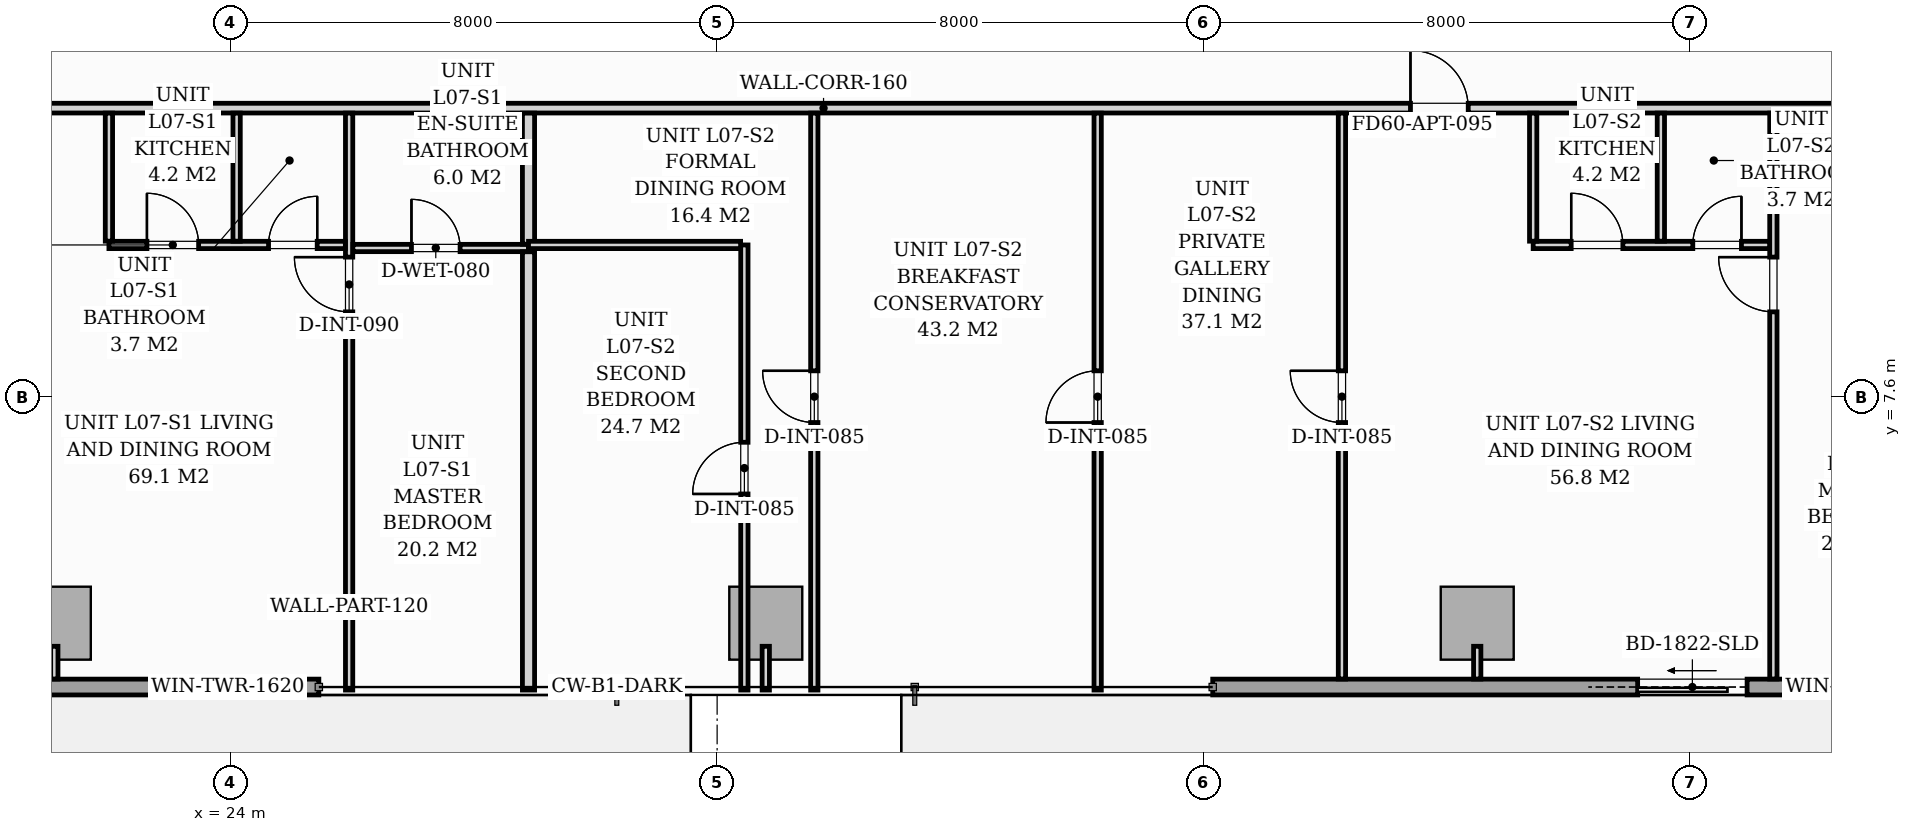
"""IFC4 building model, lengths in metres.
Left out: names, types, materials, properties, quantities, classifications, styles, units other than length and angle.
Written with IfcOpenShell. Run it as: python <this file> out.ifc"""

import sys

from ifc_helpers import new_model, si_unit, direction, frame, frame_2d, origin, origin_2d, place, context, subcontext, project, spatial, rectangle, extrude, source, transform, mapped, element, fill, save


model = new_model("IFC4")
c1 = context("Model", 3, precision=1e-05, world=origin(), true_north=direction((0.0, 1.0)))
c2 = subcontext(c1, "Body", "Model", "MODEL_VIEW")
j1 = project(units=[si_unit("LENGTHUNIT", "METRE"), si_unit("PLANEANGLEUNIT", "RADIAN")], contexts=[c1])
p1 = place(None, origin())
s1 = spatial("IfcSite", under=j1, at=p1, CompositionType="ELEMENT")
p2 = place(p1, origin())
s2 = spatial("IfcBuilding", under=s1, at=p2, CompositionType="ELEMENT")
p3 = place(p2, frame((0.0, 0.0, 29.4)))
s3 = spatial("IfcBuildingStorey", under=s2, at=p3, CompositionType="ELEMENT", Elevation=29.4)
m1 = source(origin(), c2, "Body", "SweptSolid", [
    extrude(rectangle(XDim=1.2, YDim=1.2, at=origin_2d()), origin(), (0.0, 0.0, 1.0), 3.196),
])
for number, where, z_axis, x_axis in (
    (1, (21.1, 3.88, 0.002), (0.0, 0.0, 1.0), (1.0, 0.0, 0.0)),
    (2, (32.8, 3.88, 0.002), (0.0, 0.0, 1.0), (1.0, 0.0, 0.0)),
    (3, (44.5, 3.88, 0.002), (0.0, 0.0, 1.0), (1.0, 0.0, 0.0)),
):
    element("IfcColumn", number, at=place(p3, frame(where, z_axis=z_axis, x_axis=x_axis)), inside=s3, PredefinedType="COLUMN", context=c2, shape_type="MappedRepresentation", body=[
        mapped(m1, transform((0.0, 0.0, 0.0), scale=1.0)),
    ])
p4 = place(p3, frame((57.3, 2.83, 0.0), z_axis=(0.0, 0.0, 1.0), x_axis=(-1.0, 0.0, 0.0)))
e4 = element("IfcWall", 4, at=p4, inside=s3, PredefinedType="STANDARD", context=c2, shape_type="SweptSolid", body=[
    extrude(rectangle(XDim=17.15, YDim=0.26, at=frame_2d((8.575, 0.0))), origin(), (0.0, 0.0, 1.0), 2.94),
])
p5 = place(p4, frame((8.362, 0.0, 0.0)))
e5 = element("IfcOpeningElement", 5, at=p5, cuts=e4, PredefinedType="OPENING", context=c2, shape_type="SweptSolid", body=[
    extrude(rectangle(XDim=1.8, YDim=2.06, at=frame_2d((0.9, 1.03))), frame((0.0, 0.14, 0.0), z_axis=(0.0, -1.0, 0.0), x_axis=(1.0, 0.0, 0.0)), (0.0, 0.0, 1.0), 0.28),
])
p6 = place(p4, frame((2.05, 0.0, 0.65)))
e6 = element("IfcOpeningElement", 6, at=p6, cuts=e4, PredefinedType="OPENING", context=c2, shape_type="SweptSolid", body=[
    extrude(rectangle(XDim=1.6, YDim=1.5, at=frame_2d((0.8, 0.75))), frame((0.0, 0.14, 0.0), z_axis=(0.0, -1.0, 0.0), x_axis=(1.0, 0.0, 0.0)), (0.0, 0.0, 1.0), 0.28),
])
p7 = place(p4, frame((5.675, 0.0, 0.75)))
e7 = element("IfcOpeningElement", 7, at=p7, cuts=e4, PredefinedType="OPENING", context=c2, shape_type="SweptSolid", body=[
    extrude(rectangle(XDim=1.6, YDim=1.5, at=frame_2d((0.8, 0.75))), frame((0.0, 0.14, 0.0), z_axis=(0.0, -1.0, 0.0), x_axis=(1.0, 0.0, 0.0)), (0.0, 0.0, 1.0), 0.28),
])
p8 = place(p3, frame((25.45, 2.83, 0.0), z_axis=(0.0, 0.0, 1.0), x_axis=(-1.0, 0.0, 0.0)))
e8 = element("IfcWall", 8, at=p8, inside=s3, PredefinedType="STANDARD", context=c2, shape_type="SweptSolid", body=[
    extrude(rectangle(XDim=17.15, YDim=0.26, at=frame_2d((8.575, 0.0))), origin(), (0.0, 0.0, 1.0), 2.94),
])
p9 = place(p8, frame((7.49, 0.0, 0.0)))
e9 = element("IfcOpeningElement", 9, at=p9, cuts=e8, PredefinedType="OPENING", context=c2, shape_type="SweptSolid", body=[
    extrude(rectangle(XDim=1.8, YDim=2.06, at=frame_2d((0.9, 1.03))), frame((0.0, 0.14, 0.0), z_axis=(0.0, -1.0, 0.0), x_axis=(1.0, 0.0, 0.0)), (0.0, 0.0, 1.0), 0.28),
])
p10 = place(p8, frame((0.7, 0.0, 0.65)))
e10 = element("IfcOpeningElement", 10, at=p10, cuts=e8, PredefinedType="OPENING", context=c2, shape_type="SweptSolid", body=[
    extrude(rectangle(XDim=1.6, YDim=1.5, at=frame_2d((0.8, 0.75))), frame((0.0, 0.14, 0.0), z_axis=(0.0, -1.0, 0.0), x_axis=(1.0, 0.0, 0.0)), (0.0, 0.0, 1.0), 0.28),
])
p11 = place(p8, frame((12.84, 0.0, 0.75)))
e11 = element("IfcOpeningElement", 11, at=p11, cuts=e8, PredefinedType="OPENING", context=c2, shape_type="SweptSolid", body=[
    extrude(rectangle(XDim=1.6, YDim=1.5, at=frame_2d((0.8, 0.75))), frame((0.0, 0.14, 0.0), z_axis=(0.0, -1.0, 0.0), x_axis=(1.0, 0.0, 0.0)), (0.0, 0.0, 1.0), 0.28),
])
p12 = place(p3, frame((15.2, 12.35, 0.0), z_axis=(0.0, 0.0, 1.0), x_axis=(1.0, 0.0, 0.0)))
e12 = element("IfcWall", 12, at=p12, inside=s3, PredefinedType="PARTITIONING", context=c2, shape_type="SweptSolid", body=[
    extrude(rectangle(XDim=37.1, YDim=0.16, at=frame_2d((18.55, 0.0))), origin(), (0.0, 0.0, 1.0), 2.94),
])
p13 = place(p12, frame((2.964, 0.0, 0.0)))
e13 = element("IfcOpeningElement", 13, at=p13, cuts=e12, PredefinedType="OPENING", context=c2, shape_type="SweptSolid", body=[
    extrude(rectangle(XDim=0.95, YDim=2.06, at=frame_2d((0.475, 1.03))), frame((0.0, 0.09, 0.0), z_axis=(0.0, -1.0, 0.0), x_axis=(1.0, 0.0, 0.0)), (0.0, 0.0, 1.0), 0.18),
])
p14 = place(p12, frame((28.202, 0.0, 0.0)))
e14 = element("IfcOpeningElement", 14, at=p14, cuts=e12, PredefinedType="OPENING", context=c2, shape_type="SweptSolid", body=[
    extrude(rectangle(XDim=0.95, YDim=2.06, at=frame_2d((0.475, 1.03))), frame((0.0, 0.09, 0.0), z_axis=(0.0, -1.0, 0.0), x_axis=(1.0, 0.0, 0.0)), (0.0, 0.0, 1.0), 0.18),
])
p15 = place(p3, frame((25.948, 2.78, 0.0), z_axis=(0.0, 0.0, 1.0), x_axis=(0.0, 1.0, 0.0)))
e15 = element("IfcWall", 15, at=p15, inside=s3, PredefinedType="PARTITIONING", context=c2, shape_type="SweptSolid", body=[
    extrude(rectangle(XDim=9.488, YDim=0.12, at=frame_2d((4.744, 0.0))), origin(), (0.0, 0.0, 1.0), 2.94),
])
p16 = place(p15, frame((6.22, 0.0, 0.0)))
e16 = element("IfcOpeningElement", 16, at=p16, cuts=e15, PredefinedType="OPENING", context=c2, shape_type="SweptSolid", body=[
    extrude(rectangle(XDim=0.9, YDim=2.05, at=frame_2d((0.45, 1.025))), frame((0.0, 0.07, 0.0), z_axis=(0.0, -1.0, 0.0), x_axis=(1.0, 0.0, 0.0)), (0.0, 0.0, 1.0), 0.14),
])
p17 = place(p3, frame((21.998, 10.1, 0.0), z_axis=(0.0, 0.0, 1.0), x_axis=(1.0, 0.0, 0.0)))
e17 = element("IfcWall", 17, at=p17, inside=s3, PredefinedType="PARTITIONING", context=c2, shape_type="SweptSolid", body=[
    extrude(rectangle(XDim=3.888, YDim=0.12, at=frame_2d((1.944, 0.0))), origin(), (0.0, 0.0, 1.0), 2.94),
])
p18 = place(p17, frame((0.625, 0.0, 0.0)))
e18 = element("IfcOpeningElement", 18, at=p18, cuts=e17, PredefinedType="OPENING", context=c2, shape_type="SweptSolid", body=[
    extrude(rectangle(XDim=0.85, YDim=2.05, at=frame_2d((0.425, 1.025))), frame((0.0, 0.07, 0.0), z_axis=(0.0, -1.0, 0.0), x_axis=(1.0, 0.0, 0.0)), (0.0, 0.0, 1.0), 0.14),
])
p19 = place(p17, frame((2.625, 0.0, 0.0)))
e19 = element("IfcOpeningElement", 19, at=p19, cuts=e17, PredefinedType="OPENING", context=c2, shape_type="SweptSolid", body=[
    extrude(rectangle(XDim=0.8, YDim=2.02, at=frame_2d((0.4, 1.01))), frame((0.0, 0.07, 0.0), z_axis=(0.0, -1.0, 0.0), x_axis=(1.0, 0.0, 0.0)), (0.0, 0.0, 1.0), 0.14),
])
for number, where, z_axis, x_axis in (
    (20, (24.098, 10.162, 0.0), (0.0, 0.0, 1.0), (0.0, 1.0, 0.0)),
    (21, (21.998, 10.162, 0.0), (0.0, 0.0, 1.0), (0.0, 1.0, 0.0)),
):
    element("IfcWall", number, at=place(p3, frame(where, z_axis=z_axis, x_axis=x_axis)), inside=s3, PredefinedType="PARTITIONING", context=c2, shape_type="SweptSolid", body=[
        extrude(rectangle(XDim=2.106, YDim=0.12, at=frame_2d((1.053, 0.0))), origin(), (0.0, 0.0, 1.0), 2.94),
    ])
p20 = place(p3, frame((26.01, 10.05, 0.0), z_axis=(0.0, 0.0, 1.0), x_axis=(1.0, 0.0, 0.0)))
e22 = element("IfcWall", 22, at=p20, inside=s3, PredefinedType="PARTITIONING", context=c2, shape_type="SweptSolid", body=[
    extrude(rectangle(XDim=2.888, YDim=0.12, at=frame_2d((1.444, 0.0))), origin(), (0.0, 0.0, 1.0), 2.94),
])
p21 = place(p20, frame((0.963, 0.0, 0.0)))
e23 = element("IfcOpeningElement", 23, at=p21, cuts=e22, PredefinedType="OPENING", context=c2, shape_type="SweptSolid", body=[
    extrude(rectangle(XDim=0.8, YDim=2.02, at=frame_2d((0.4, 1.01))), frame((0.0, 0.07, 0.0), z_axis=(0.0, -1.0, 0.0), x_axis=(1.0, 0.0, 0.0)), (0.0, 0.0, 1.0), 0.14),
])
p22 = place(p3, frame((28.898, 2.78, 0.0), z_axis=(0.0, 0.0, 1.0), x_axis=(0.0, 1.0, 0.0)))
e24 = element("IfcWall", 24, at=p22, inside=s3, PredefinedType="PARTITIONING", context=c2, shape_type="SweptSolid", body=[
    extrude(rectangle(XDim=7.208, YDim=0.2, at=frame_2d((3.604, 0.0))), origin(), (0.0, 0.0, 1.0), 2.94),
])
p23 = place(p3, frame((28.898, 10.112, 0.0), z_axis=(0.0, 0.0, 1.0), x_axis=(0.0, 1.0, 0.0)))
e25 = element("IfcWall", 25, at=p23, inside=s3, PredefinedType="PARTITIONING", context=c2, shape_type="SweptSolid", body=[
    extrude(rectangle(XDim=2.156, YDim=0.2, at=frame_2d((1.078, 0.0))), origin(), (0.0, 0.0, 1.0), 2.94),
])
p24 = place(p3, frame((49.37, 2.962, 0.0), z_axis=(0.0, 0.0, 1.0), x_axis=(0.0, 1.0, 0.0)))
e26 = element("IfcWall", 26, at=p24, inside=s3, PredefinedType="PARTITIONING", context=c2, shape_type="SweptSolid", body=[
    extrude(rectangle(XDim=9.306, YDim=0.12, at=frame_2d((4.653, 0.0))), origin(), (0.0, 0.0, 1.0), 2.94),
])
p25 = place(p24, frame((6.038, 0.0, 0.0)))
e27 = element("IfcOpeningElement", 27, at=p25, cuts=e26, PredefinedType="OPENING", context=c2, shape_type="SweptSolid", body=[
    extrude(rectangle(XDim=0.9, YDim=2.05, at=frame_2d((0.45, 1.025))), frame((0.0, 0.07, 0.0), z_axis=(0.0, -1.0, 0.0), x_axis=(1.0, 0.0, 0.0)), (0.0, 0.0, 1.0), 0.14),
])
p26 = place(p3, frame((45.42, 10.1, 0.0), z_axis=(0.0, 0.0, 1.0), x_axis=(1.0, 0.0, 0.0)))
e28 = element("IfcWall", 28, at=p26, inside=s3, PredefinedType="PARTITIONING", context=c2, shape_type="SweptSolid", body=[
    extrude(rectangle(XDim=3.888, YDim=0.12, at=frame_2d((1.944, 0.0))), origin(), (0.0, 0.0, 1.0), 2.94),
])
p27 = place(p26, frame((0.625, 0.0, 0.0)))
e29 = element("IfcOpeningElement", 29, at=p27, cuts=e28, PredefinedType="OPENING", context=c2, shape_type="SweptSolid", body=[
    extrude(rectangle(XDim=0.85, YDim=2.05, at=frame_2d((0.425, 1.025))), frame((0.0, 0.07, 0.0), z_axis=(0.0, -1.0, 0.0), x_axis=(1.0, 0.0, 0.0)), (0.0, 0.0, 1.0), 0.14),
])
p28 = place(p26, frame((2.625, 0.0, 0.0)))
e30 = element("IfcOpeningElement", 30, at=p28, cuts=e28, PredefinedType="OPENING", context=c2, shape_type="SweptSolid", body=[
    extrude(rectangle(XDim=0.8, YDim=2.02, at=frame_2d((0.4, 1.01))), frame((0.0, 0.07, 0.0), z_axis=(0.0, -1.0, 0.0), x_axis=(1.0, 0.0, 0.0)), (0.0, 0.0, 1.0), 0.14),
])
for number, where, z_axis, x_axis in (
    (31, (47.52, 10.162, 0.0), (0.0, 0.0, 1.0), (0.0, 1.0, 0.0)),
    (32, (45.42, 10.162, 0.0), (0.0, 0.0, 1.0), (0.0, 1.0, 0.0)),
):
    element("IfcWall", number, at=place(p3, frame(where, z_axis=z_axis, x_axis=x_axis)), inside=s3, PredefinedType="PARTITIONING", context=c2, shape_type="SweptSolid", body=[
        extrude(rectangle(XDim=2.106, YDim=0.12, at=frame_2d((1.053, 0.0))), origin(), (0.0, 0.0, 1.0), 2.94),
    ])
p29 = place(p3, frame((32.448, 2.78, 0.0), z_axis=(0.0, 0.0, 1.0), x_axis=(0.0, 1.0, 0.0)))
e33 = element("IfcWall", 33, at=p29, inside=s3, PredefinedType="PARTITIONING", context=c2, shape_type="SweptSolid", body=[
    extrude(rectangle(XDim=7.32, YDim=0.12, at=frame_2d((3.66, 0.0))), origin(), (0.0, 0.0, 1.0), 2.94),
])
p30 = place(p29, frame((3.225, 0.0, 0.0)))
e34 = element("IfcOpeningElement", 34, at=p30, cuts=e33, PredefinedType="OPENING", context=c2, shape_type="SweptSolid", body=[
    extrude(rectangle(XDim=0.85, YDim=2.05, at=frame_2d((0.425, 1.025))), frame((0.0, 0.07, 0.0), z_axis=(0.0, -1.0, 0.0), x_axis=(1.0, 0.0, 0.0)), (0.0, 0.0, 1.0), 0.14),
])
p31 = place(p3, frame((28.898, 10.1, 0.0), z_axis=(0.0, 0.0, 1.0), x_axis=(1.0, 0.0, 0.0)))
e35 = element("IfcWall", 35, at=p31, inside=s3, PredefinedType="PARTITIONING", context=c2, shape_type="SweptSolid", body=[
    extrude(rectangle(XDim=3.488, YDim=0.12, at=frame_2d((1.744, 0.0))), origin(), (0.0, 0.0, 1.0), 2.94),
])
p32 = place(p3, frame((33.598, 2.78, 0.0), z_axis=(0.0, 0.0, 1.0), x_axis=(0.0, 1.0, 0.0)))
e36 = element("IfcWall", 36, at=p32, inside=s3, PredefinedType="PARTITIONING", context=c2, shape_type="SweptSolid", body=[
    extrude(rectangle(XDim=9.488, YDim=0.12, at=frame_2d((4.744, 0.0))), origin(), (0.0, 0.0, 1.0), 2.94),
])
p33 = place(p32, frame((4.4, 0.0, 0.0)))
e37 = element("IfcOpeningElement", 37, at=p33, cuts=e36, PredefinedType="OPENING", context=c2, shape_type="SweptSolid", body=[
    extrude(rectangle(XDim=0.85, YDim=2.05, at=frame_2d((0.425, 1.025))), frame((0.0, 0.07, 0.0), z_axis=(0.0, -1.0, 0.0), x_axis=(1.0, 0.0, 0.0)), (0.0, 0.0, 1.0), 0.14),
])
p34 = place(p3, frame((38.258, 2.78, 0.0), z_axis=(0.0, 0.0, 1.0), x_axis=(0.0, 1.0, 0.0)))
e38 = element("IfcWall", 38, at=p34, inside=s3, PredefinedType="PARTITIONING", context=c2, shape_type="SweptSolid", body=[
    extrude(rectangle(XDim=9.488, YDim=0.12, at=frame_2d((4.744, 0.0))), origin(), (0.0, 0.0, 1.0), 2.94),
])
p35 = place(p34, frame((4.4, 0.0, 0.0)))
e39 = element("IfcOpeningElement", 39, at=p35, cuts=e38, PredefinedType="OPENING", context=c2, shape_type="SweptSolid", body=[
    extrude(rectangle(XDim=0.85, YDim=2.05, at=frame_2d((0.425, 1.025))), frame((0.0, 0.07, 0.0), z_axis=(0.0, -1.0, 0.0), x_axis=(1.0, 0.0, 0.0)), (0.0, 0.0, 1.0), 0.14),
])
p36 = place(p3, frame((42.275, 2.962, 0.0), z_axis=(0.0, 0.0, 1.0), x_axis=(0.0, 1.0, 0.0)))
e40 = element("IfcWall", 40, at=p36, inside=s3, PredefinedType="PARTITIONING", context=c2, shape_type="SweptSolid", body=[
    extrude(rectangle(XDim=9.306, YDim=0.12, at=frame_2d((4.653, 0.0))), origin(), (0.0, 0.0, 1.0), 2.94),
])
p37 = place(p36, frame((4.218, 0.0, 0.0)))
e41 = element("IfcOpeningElement", 41, at=p37, cuts=e40, PredefinedType="OPENING", context=c2, shape_type="SweptSolid", body=[
    extrude(rectangle(XDim=0.85, YDim=2.05, at=frame_2d((0.425, 1.025))), frame((0.0, 0.07, 0.0), z_axis=(0.0, -1.0, 0.0), x_axis=(1.0, 0.0, 0.0)), (0.0, 0.0, 1.0), 0.14),
])
p38 = place(p3, frame((21.1, 3.5, 0.0), z_axis=(0.0, 0.0, 1.0), x_axis=(0.0, -1.0, 0.0)))
e42 = element("IfcWall", 42, at=p38, inside=s3, PredefinedType="PARTITIONING", context=c2, shape_type="SweptSolid", body=[
    extrude(rectangle(XDim=0.538, YDim=0.12, at=frame_2d((0.269, 0.0))), origin(), (0.0, 0.0, 1.0), 2.94),
])
p39 = place(p3, frame((32.8, 3.5, 0.0), z_axis=(0.0, 0.0, 1.0), x_axis=(0.0, -1.0, 0.0)))
e43 = element("IfcWall", 43, at=p39, inside=s3, PredefinedType="PARTITIONING", context=c2, shape_type="SweptSolid", body=[
    extrude(rectangle(XDim=0.72, YDim=0.12, at=frame_2d((0.36, 0.0))), origin(), (0.0, 0.0, 1.0), 2.94),
])
p40 = place(p3, frame((44.5, 3.5, 0.0), z_axis=(0.0, 0.0, 1.0), x_axis=(0.0, -1.0, 0.0)))
e44 = element("IfcWall", 44, at=p40, inside=s3, PredefinedType="PARTITIONING", context=c2, shape_type="SweptSolid", body=[
    extrude(rectangle(XDim=0.538, YDim=0.12, at=frame_2d((0.269, 0.0))), origin(), (0.0, 0.0, 1.0), 2.94),
])
m2 = source(origin(), c2, "Body", "SweptSolid", [
    extrude(rectangle(XDim=1.6, YDim=1.5, at=frame_2d((0.8, 0.75))), frame((0.0, 0.03, 0.0), z_axis=(0.0, -1.0, 0.0), x_axis=(1.0, 0.0, 0.0)), (0.0, 0.0, 1.0), 0.06),
])
p41 = place(p10, origin())
e45 = element("IfcWindow", 45, at=p41, inside=s3, PartitioningType="SINGLE_PANEL", PredefinedType="WINDOW", context=c2, shape_type="MappedRepresentation", body=[
    mapped(m2, transform((0.0, 0.0, 0.0), scale=1.0)),
])
fill(e10, e45)
m3 = source(origin(), c2, "Body", "SweptSolid", [
    extrude(rectangle(XDim=1.8, YDim=2.06, at=frame_2d((0.9, 1.03))), frame((0.0, 0.025, 0.0), z_axis=(0.0, -1.0, 0.0), x_axis=(1.0, 0.0, 0.0)), (0.0, 0.0, 1.0), 0.05),
])
p42 = place(p5, origin())
e46 = element("IfcDoor", 46, at=p42, inside=s3, OperationType="SLIDING_TO_RIGHT", PredefinedType="DOOR", context=c2, shape_type="MappedRepresentation", body=[
    mapped(m3, transform((0.0, 0.0, 0.0), scale=1.0)),
])
fill(e5, e46)
p43 = place(p7, origin())
e47 = element("IfcWindow", 47, at=p43, inside=s3, PartitioningType="SINGLE_PANEL", PredefinedType="WINDOW", context=c2, shape_type="MappedRepresentation", body=[
    mapped(m2, transform((0.0, 0.0, 0.0), scale=1.0)),
])
fill(e7, e47)
m4 = source(origin(), c2, "Body", "SweptSolid", [
    extrude(rectangle(XDim=0.8, YDim=2.02, at=frame_2d((0.4, 1.01))), frame((0.0, 0.025, 0.0), z_axis=(0.0, -1.0, 0.0), x_axis=(1.0, 0.0, 0.0)), (0.0, 0.0, 1.0), 0.05),
])
p44 = place(p21, origin())
e48 = element("IfcDoor", 48, at=p44, inside=s3, OperationType="SINGLE_SWING_LEFT", PredefinedType="DOOR", context=c2, shape_type="MappedRepresentation", body=[
    mapped(m4, transform((0.0, 0.0, 0.0), scale=1.0)),
])
fill(e23, e48)
m5 = source(origin(), c2, "Body", "SweptSolid", [
    extrude(rectangle(XDim=0.9, YDim=2.05, at=frame_2d((0.45, 1.025))), frame((0.0, 0.025, 0.0), z_axis=(0.0, -1.0, 0.0), x_axis=(1.0, 0.0, 0.0)), (0.0, 0.0, 1.0), 0.05),
])
p45 = place(p16, origin())
e49 = element("IfcDoor", 49, at=p45, inside=s3, OperationType="SINGLE_SWING_RIGHT", PredefinedType="DOOR", context=c2, shape_type="MappedRepresentation", body=[
    mapped(m5, transform((0.0, 0.0, 0.0), scale=1.0)),
])
fill(e16, e49)
m6 = source(origin(), c2, "Body", "SweptSolid", [
    extrude(rectangle(XDim=0.85, YDim=2.05, at=frame_2d((0.425, 1.025))), frame((0.0, 0.025, 0.0), z_axis=(0.0, -1.0, 0.0), x_axis=(1.0, 0.0, 0.0)), (0.0, 0.0, 1.0), 0.05),
])
p46 = place(p18, origin())
e50 = element("IfcDoor", 50, at=p46, inside=s3, OperationType="SINGLE_SWING_LEFT", PredefinedType="DOOR", context=c2, shape_type="MappedRepresentation", body=[
    mapped(m6, transform((0.0, 0.0, 0.0), scale=1.0)),
])
fill(e18, e50)
p47 = place(p19, origin())
e51 = element("IfcDoor", 51, at=p47, inside=s3, OperationType="SINGLE_SWING_RIGHT", PredefinedType="DOOR", context=c2, shape_type="MappedRepresentation", body=[
    mapped(m4, transform((0.0, 0.0, 0.0), scale=1.0)),
])
fill(e19, e51)
p48 = place(p30, origin())
e52 = element("IfcDoor", 52, at=p48, inside=s3, OperationType="SINGLE_SWING_LEFT", PredefinedType="DOOR", context=c2, shape_type="MappedRepresentation", body=[
    mapped(m6, transform((0.0, 0.0, 0.0), scale=1.0)),
])
fill(e34, e52)
p49 = place(p33, origin())
e53 = element("IfcDoor", 53, at=p49, inside=s3, OperationType="SINGLE_SWING_RIGHT", PredefinedType="DOOR", context=c2, shape_type="MappedRepresentation", body=[
    mapped(m6, transform((0.0, 0.0, 0.0), scale=1.0)),
])
fill(e37, e53)
p50 = place(p35, origin())
e54 = element("IfcDoor", 54, at=p50, inside=s3, OperationType="SINGLE_SWING_LEFT", PredefinedType="DOOR", context=c2, shape_type="MappedRepresentation", body=[
    mapped(m6, transform((0.0, 0.0, 0.0), scale=1.0)),
])
fill(e39, e54)
p51 = place(p37, origin())
e55 = element("IfcDoor", 55, at=p51, inside=s3, OperationType="SINGLE_SWING_RIGHT", PredefinedType="DOOR", context=c2, shape_type="MappedRepresentation", body=[
    mapped(m6, transform((0.0, 0.0, 0.0), scale=1.0)),
])
fill(e41, e55)
m7 = source(origin(), c2, "Body", "SweptSolid", [
    extrude(rectangle(XDim=0.95, YDim=2.06, at=frame_2d((0.475, 1.03))), frame((0.0, 0.025, 0.0), z_axis=(0.0, -1.0, 0.0), x_axis=(1.0, 0.0, 0.0)), (0.0, 0.0, 1.0), 0.05),
])
p52 = place(p14, origin())
e56 = element("IfcDoor", 56, at=p52, inside=s3, OperationType="SINGLE_SWING_LEFT", PredefinedType="DOOR", context=c2, shape_type="MappedRepresentation", body=[
    mapped(m7, transform((0.0, 0.0, 0.0), scale=1.0)),
])
fill(e14, e56)
p53 = place(p25, origin())
e57 = element("IfcDoor", 57, at=p53, inside=s3, OperationType="SINGLE_SWING_RIGHT", PredefinedType="DOOR", context=c2, shape_type="MappedRepresentation", body=[
    mapped(m5, transform((0.0, 0.0, 0.0), scale=1.0)),
])
fill(e27, e57)
p54 = place(p27, origin())
e58 = element("IfcDoor", 58, at=p54, inside=s3, OperationType="SINGLE_SWING_LEFT", PredefinedType="DOOR", context=c2, shape_type="MappedRepresentation", body=[
    mapped(m6, transform((0.0, 0.0, 0.0), scale=1.0)),
])
fill(e29, e58)
p55 = place(p28, origin())
e59 = element("IfcDoor", 59, at=p55, inside=s3, OperationType="SINGLE_SWING_RIGHT", PredefinedType="DOOR", context=c2, shape_type="MappedRepresentation", body=[
    mapped(m4, transform((0.0, 0.0, 0.0), scale=1.0)),
])
fill(e30, e59)
save(model, sys.argv[1])
